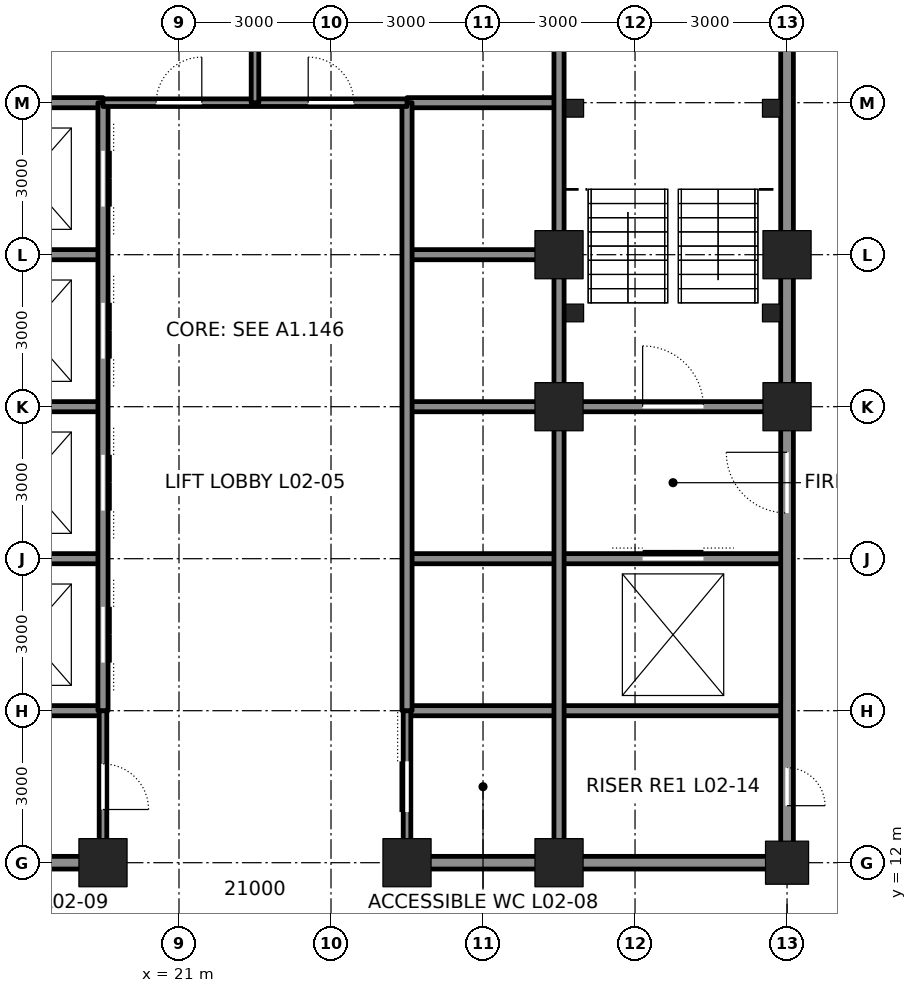
"""IFC4 building model, lengths in metres.
Left out: names, types, materials, properties, quantities, classifications, styles, units other than length and angle.
Written with IfcOpenShell. Run it as: python <this file> out.ifc"""

import sys

from ifc_helpers import new_model, si_unit, direction, frame, frame_2d, origin, origin_2d, place, context, subcontext, project, spatial, rectangle, hollow_rectangle, extrude, element, fill, save


model = new_model("IFC4")
c1 = context("Model", 3, precision=1e-05, world=origin(), true_north=direction((0.0, 1.0)))
c2 = subcontext(c1, "Body", "Model", "MODEL_VIEW")
j1 = project(units=[si_unit("LENGTHUNIT", "METRE"), si_unit("PLANEANGLEUNIT", "RADIAN")], contexts=[c1])
p1 = place(None, origin())
s1 = spatial("IfcSite", under=j1, at=p1, CompositionType="ELEMENT")
p2 = place(p1, origin())
s2 = spatial("IfcBuilding", under=s1, at=p2, CompositionType="ELEMENT")
p3 = place(p2, frame((0.0, 0.0, 13.5)))
s3 = spatial("IfcBuildingStorey", under=s2, at=p3, CompositionType="ELEMENT", Elevation=13.5)
for number, where, z_axis, x_axis in (
    (1, (19.5, 12.0, 0.0), (0.0, 0.0, 1.0), (1.0, 0.0, 0.0)),
    (2, (25.5, 12.0, 0.0), (0.0, 0.0, 1.0), (1.0, 0.0, 0.0)),
    (3, (28.5, 12.0, 0.0), (0.0, 0.0, 1.0), (1.0, 0.0, 0.0)),
):
    element("IfcColumn", number, at=place(p3, frame(where, z_axis=z_axis, x_axis=x_axis)), inside=s3, PredefinedType="COLUMN", context=c2, shape_type="SweptSolid", body=[
        extrude(hollow_rectangle(XDim=0.95, YDim=0.95, WallThickness=0.095, at=origin_2d()), origin(), (0.0, 0.0, 1.0), 6.0),
    ])
p4 = place(p3, frame((33.0, 12.0, 0.0), z_axis=(0.0, 0.0, 1.0), x_axis=(1.0, 0.0, 0.0)))
e4 = element("IfcColumn", 4, at=p4, inside=s3, PredefinedType="COLUMN", context=c2, shape_type="SweptSolid", body=[
    extrude(hollow_rectangle(XDim=0.85, YDim=0.85, WallThickness=0.085, at=origin_2d()), origin(), (0.0, 0.0, 1.0), 6.0),
])
for number, where, z_axis, x_axis in (
    (5, (33.0, 21.0, 0.0), (0.0, 0.0, 1.0), (1.0, 0.0, 0.0)),
    (6, (33.0, 24.0, 0.0), (0.0, 0.0, 1.0), (1.0, 0.0, 0.0)),
    (7, (28.5, 21.0, 0.0), (0.0, 0.0, 1.0), (1.0, 0.0, 0.0)),
    (8, (28.5, 24.0, 0.0), (0.0, 0.0, 1.0), (1.0, 0.0, 0.0)),
):
    element("IfcColumn", number, at=place(p3, frame(where, z_axis=z_axis, x_axis=x_axis)), inside=s3, PredefinedType="COLUMN", context=c2, shape_type="SweptSolid", body=[
        extrude(hollow_rectangle(XDim=0.95, YDim=0.95, WallThickness=0.095, at=origin_2d()), origin(), (0.0, 0.0, 1.0), 6.0),
    ])
for number, where, z_axis, x_axis in (
    (9, (16.75, 12.0, 0.0), (0.0, 0.0, 1.0), (1.0, 0.0, 0.0)),
    (10, (25.75, 12.0, 0.0), (0.0, 0.0, 1.0), (1.0, 0.0, 0.0)),
):
    element("IfcWall", number, at=place(p3, frame(where, z_axis=z_axis, x_axis=x_axis)), inside=s3, PredefinedType="SOLIDWALL", context=c2, shape_type="SweptSolid", body=[
        extrude(rectangle(XDim=2.5, YDim=0.25, at=frame_2d((1.25, 0.0))), origin(), (0.0, 0.0, 1.0), 4.941),
    ])
p5 = place(p3, frame((28.75, 12.0, 0.0), z_axis=(0.0, 0.0, 1.0), x_axis=(1.0, 0.0, 0.0)))
e11 = element("IfcWall", 11, at=p5, inside=s3, PredefinedType="SOLIDWALL", context=c2, shape_type="SweptSolid", body=[
    extrude(rectangle(XDim=4.0, YDim=0.25, at=frame_2d((2.0, 0.0))), origin(), (0.0, 0.0, 1.0), 4.941),
])
for number, where, z_axis, x_axis in (
    (12, (12.0, 15.0, 0.0), (0.0, 0.0, 1.0), (1.0, 0.0, 0.0)),
    (13, (25.5, 15.0, 0.0), (0.0, 0.0, 1.0), (1.0, 0.0, 0.0)),
):
    element("IfcWall", number, at=place(p3, frame(where, z_axis=z_axis, x_axis=x_axis)), inside=s3, PredefinedType="SOLIDWALL", context=c2, shape_type="SweptSolid", body=[
        extrude(rectangle(XDim=7.5, YDim=0.2, at=frame_2d((3.75, 0.0))), origin(), (0.0, 0.0, 1.0), 5.8),
    ])
for number, where, z_axis, x_axis in (
    (14, (16.75, 24.0, 0.0), (0.0, 0.0, 1.0), (1.0, 0.0, 0.0)),
    (15, (25.5, 24.0, 0.0), (0.0, 0.0, 1.0), (1.0, 0.0, 0.0)),
):
    element("IfcWall", number, at=place(p3, frame(where, z_axis=z_axis, x_axis=x_axis)), inside=s3, PredefinedType="SOLIDWALL", context=c2, shape_type="SweptSolid", body=[
        extrude(rectangle(XDim=2.75, YDim=0.2, at=frame_2d((1.375, 0.0))), origin(), (0.0, 0.0, 1.0), 4.85),
    ])
p6 = place(p3, frame((12.0, 27.0, 0.0), z_axis=(0.0, 0.0, 1.0), x_axis=(1.0, 0.0, 0.0)))
e16 = element("IfcWall", 16, at=p6, inside=s3, PredefinedType="SOLIDWALL", context=c2, shape_type="SweptSolid", body=[
    extrude(rectangle(XDim=7.5, YDim=0.2, at=frame_2d((3.75, 0.0))), origin(), (0.0, 0.0, 1.0), 5.8),
])
p7 = place(p6, frame((1.65, 0.0, 0.0)))
e17 = element("IfcOpeningElement", 17, at=p7, cuts=e16, PredefinedType="OPENING", context=c2, shape_type="SweptSolid", body=[
    extrude(rectangle(XDim=1.2, YDim=2.1, at=frame_2d((0.6, 1.05))), frame((0.0, 0.11, 0.0), z_axis=(0.0, -1.0, 0.0), x_axis=(1.0, 0.0, 0.0)), (0.0, 0.0, 1.0), 0.22),
])
for number, where, z_axis, x_axis in (
    (18, (25.5, 27.0, 0.0), (0.0, 0.0, 1.0), (1.0, 0.0, 0.0)),
    (19, (16.5, 18.0, 0.0), (0.0, 0.0, 1.0), (1.0, 0.0, 0.0)),
):
    element("IfcWall", number, at=place(p3, frame(where, z_axis=z_axis, x_axis=x_axis)), inside=s3, PredefinedType="SOLIDWALL", context=c2, shape_type="SweptSolid", body=[
        extrude(rectangle(XDim=3.0, YDim=0.2, at=frame_2d((1.5, 0.0))), origin(), (0.0, 0.0, 1.0), 5.8),
    ])
p8 = place(p3, frame((25.5, 18.0, 0.0), z_axis=(0.0, 0.0, 1.0), x_axis=(1.0, 0.0, 0.0)))
e20 = element("IfcWall", 20, at=p8, inside=s3, PredefinedType="SOLIDWALL", context=c2, shape_type="SweptSolid", body=[
    extrude(rectangle(XDim=7.5, YDim=0.2, at=frame_2d((3.75, 0.0))), origin(), (0.0, 0.0, 1.0), 5.8),
])
p9 = place(p8, frame((4.65, 0.0, 0.0)))
e21 = element("IfcOpeningElement", 21, at=p9, cuts=e20, PredefinedType="OPENING", context=c2, shape_type="SweptSolid", body=[
    extrude(rectangle(XDim=1.2, YDim=2.1, at=frame_2d((0.6, 1.05))), frame((0.0, 0.11, 0.0), z_axis=(0.0, -1.0, 0.0), x_axis=(1.0, 0.0, 0.0)), (0.0, 0.0, 1.0), 0.22),
])
for number, where, z_axis, x_axis in (
    (22, (16.75, 21.0, 0.0), (0.0, 0.0, 1.0), (1.0, 0.0, 0.0)),
    (23, (25.5, 21.0, 0.0), (0.0, 0.0, 1.0), (1.0, 0.0, 0.0)),
):
    element("IfcWall", number, at=place(p3, frame(where, z_axis=z_axis, x_axis=x_axis)), inside=s3, PredefinedType="SOLIDWALL", context=c2, shape_type="SweptSolid", body=[
        extrude(rectangle(XDim=2.75, YDim=0.2, at=frame_2d((1.375, 0.0))), origin(), (0.0, 0.0, 1.0), 4.85),
    ])
p10 = place(p3, frame((28.75, 21.0, 0.0), z_axis=(0.0, 0.0, 1.0), x_axis=(1.0, 0.0, 0.0)))
e24 = element("IfcWall", 24, at=p10, inside=s3, PredefinedType="SOLIDWALL", context=c2, shape_type="SweptSolid", body=[
    extrude(rectangle(XDim=4.0, YDim=0.2, at=frame_2d((2.0, 0.0))), origin(), (0.0, 0.0, 1.0), 4.85),
])
p11 = place(p10, frame((1.4, 0.0, 0.0)))
e25 = element("IfcOpeningElement", 25, at=p11, cuts=e24, PredefinedType="OPENING", context=c2, shape_type="SweptSolid", body=[
    extrude(rectangle(XDim=1.2, YDim=2.1, at=frame_2d((0.6, 1.05))), frame((0.0, 0.11, 0.0), z_axis=(0.0, -1.0, 0.0), x_axis=(1.0, 0.0, 0.0)), (0.0, 0.0, 1.0), 0.22),
])
p12 = place(p3, frame((19.5, 12.25, 0.0), z_axis=(0.0, 0.0, 1.0), x_axis=(0.0, 1.0, 0.0)))
e26 = element("IfcWall", 26, at=p12, inside=s3, PredefinedType="PARTITIONING", context=c2, shape_type="SweptSolid", body=[
    extrude(rectangle(XDim=2.75, YDim=0.15, at=frame_2d((1.375, 0.0))), origin(), (0.0, 0.0, 1.0), 4.825),
])
p13 = place(p12, frame((0.8, 0.0, 0.0)))
e27 = element("IfcOpeningElement", 27, at=p13, cuts=e26, PredefinedType="OPENING", context=c2, shape_type="SweptSolid", body=[
    extrude(rectangle(XDim=0.9, YDim=2.1, at=frame_2d((0.45, 1.05))), frame((0.0, 0.085, 0.0), z_axis=(0.0, -1.0, 0.0), x_axis=(1.0, 0.0, 0.0)), (0.0, 0.0, 1.0), 0.17),
])
p14 = place(p3, frame((19.5, 15.0, 0.0), z_axis=(0.0, 0.0, 1.0), x_axis=(0.0, 1.0, 0.0)))
e28 = element("IfcWall", 28, at=p14, inside=s3, PredefinedType="SOLIDWALL", context=c2, shape_type="SweptSolid", body=[
    extrude(rectangle(XDim=12.0, YDim=0.2, at=frame_2d((6.0, 0.0))), origin(), (0.0, 0.0, 1.0), 4.825),
])
p15 = place(p14, frame((0.95, 0.0, 0.0)))
e29 = element("IfcOpeningElement", 29, at=p15, cuts=e28, PredefinedType="OPENING", context=c2, shape_type="SweptSolid", body=[
    extrude(rectangle(XDim=1.1, YDim=2.1, at=frame_2d((0.55, 1.05))), frame((0.0, 0.11, 0.0), z_axis=(0.0, -1.0, 0.0), x_axis=(1.0, 0.0, 0.0)), (0.0, 0.0, 1.0), 0.22),
])
p16 = place(p14, frame((3.95, 0.0, 0.0)))
e30 = element("IfcOpeningElement", 30, at=p16, cuts=e28, PredefinedType="OPENING", context=c2, shape_type="SweptSolid", body=[
    extrude(rectangle(XDim=1.1, YDim=2.1, at=frame_2d((0.55, 1.05))), frame((0.0, 0.11, 0.0), z_axis=(0.0, -1.0, 0.0), x_axis=(1.0, 0.0, 0.0)), (0.0, 0.0, 1.0), 0.22),
])
p17 = place(p14, frame((6.95, 0.0, 0.0)))
e31 = element("IfcOpeningElement", 31, at=p17, cuts=e28, PredefinedType="OPENING", context=c2, shape_type="SweptSolid", body=[
    extrude(rectangle(XDim=1.1, YDim=2.1, at=frame_2d((0.55, 1.05))), frame((0.0, 0.11, 0.0), z_axis=(0.0, -1.0, 0.0), x_axis=(1.0, 0.0, 0.0)), (0.0, 0.0, 1.0), 0.22),
])
p18 = place(p14, frame((9.95, 0.0, 0.0)))
e32 = element("IfcOpeningElement", 32, at=p18, cuts=e28, PredefinedType="OPENING", context=c2, shape_type="SweptSolid", body=[
    extrude(rectangle(XDim=1.1, YDim=2.1, at=frame_2d((0.55, 1.05))), frame((0.0, 0.11, 0.0), z_axis=(0.0, -1.0, 0.0), x_axis=(1.0, 0.0, 0.0)), (0.0, 0.0, 1.0), 0.22),
])
p19 = place(p3, frame((25.5, 12.25, 0.0), z_axis=(0.0, 0.0, 1.0), x_axis=(0.0, 1.0, 0.0)))
e33 = element("IfcWall", 33, at=p19, inside=s3, PredefinedType="PARTITIONING", context=c2, shape_type="SweptSolid", body=[
    extrude(rectangle(XDim=2.75, YDim=0.15, at=frame_2d((1.375, 0.0))), origin(), (0.0, 0.0, 1.0), 4.825),
])
p20 = place(p19, frame((0.75, 0.0, 0.0)))
e34 = element("IfcOpeningElement", 34, at=p20, cuts=e33, PredefinedType="OPENING", context=c2, shape_type="SweptSolid", body=[
    extrude(rectangle(XDim=1.0, YDim=2.1, at=frame_2d((0.5, 1.05))), frame((0.0, 0.085, 0.0), z_axis=(0.0, -1.0, 0.0), x_axis=(1.0, 0.0, 0.0)), (0.0, 0.0, 1.0), 0.17),
])
p21 = place(p3, frame((25.5, 15.0, 0.0), z_axis=(0.0, 0.0, 1.0), x_axis=(0.0, 1.0, 0.0)))
e35 = element("IfcWall", 35, at=p21, inside=s3, PredefinedType="SOLIDWALL", context=c2, shape_type="SweptSolid", body=[
    extrude(rectangle(XDim=12.0, YDim=0.2, at=frame_2d((6.0, 0.0))), origin(), (0.0, 0.0, 1.0), 4.825),
])
p22 = place(p3, frame((28.5, 12.25, 0.0), z_axis=(0.0, 0.0, 1.0), x_axis=(0.0, 1.0, 0.0)))
e36 = element("IfcWall", 36, at=p22, inside=s3, PredefinedType="SOLIDWALL", context=c2, shape_type="SweptSolid", body=[
    extrude(rectangle(XDim=8.5, YDim=0.2, at=frame_2d((4.25, 0.0))), origin(), (0.0, 0.0, 1.0), 4.873),
])
p23 = place(p3, frame((28.5, 21.25, 0.0), z_axis=(0.0, 0.0, 1.0), x_axis=(0.0, 1.0, 0.0)))
e37 = element("IfcWall", 37, at=p23, inside=s3, PredefinedType="SOLIDWALL", context=c2, shape_type="SweptSolid", body=[
    extrude(rectangle(XDim=2.5, YDim=0.2, at=frame_2d((1.25, 0.0))), origin(), (0.0, 0.0, 1.0), 4.873),
])
p24 = place(p3, frame((28.5, 24.25, 0.0), z_axis=(0.0, 0.0, 1.0), x_axis=(0.0, 1.0, 0.0)))
e38 = element("IfcWall", 38, at=p24, inside=s3, PredefinedType="SOLIDWALL", context=c2, shape_type="SweptSolid", body=[
    extrude(rectangle(XDim=8.5, YDim=0.2, at=frame_2d((4.25, 0.0))), origin(), (0.0, 0.0, 1.0), 4.873),
])
p25 = place(p3, frame((33.0, 12.25, 0.0), z_axis=(0.0, 0.0, 1.0), x_axis=(0.0, 1.0, 0.0)))
e39 = element("IfcWall", 39, at=p25, inside=s3, PredefinedType="SOLIDWALL", context=c2, shape_type="SweptSolid", body=[
    extrude(rectangle(XDim=8.5, YDim=0.25, at=frame_2d((4.25, 0.0))), origin(), (0.0, 0.0, 1.0), 4.873),
])
p26 = place(p25, frame((6.65, 0.0, 0.0)))
e40 = element("IfcOpeningElement", 40, at=p26, cuts=e39, PredefinedType="OPENING", context=c2, shape_type="SweptSolid", body=[
    extrude(rectangle(XDim=1.2, YDim=2.1, at=frame_2d((0.6, 1.05))), frame((0.0, 0.135, 0.0), z_axis=(0.0, -1.0, 0.0), x_axis=(1.0, 0.0, 0.0)), (0.0, 0.0, 1.0), 0.27),
])
p27 = place(p25, frame((0.875, 0.0, 0.0)))
e41 = element("IfcOpeningElement", 41, at=p27, cuts=e39, PredefinedType="OPENING", context=c2, shape_type="SweptSolid", body=[
    extrude(rectangle(XDim=0.75, YDim=2.1, at=frame_2d((0.375, 1.05))), frame((0.0, 0.135, 0.0), z_axis=(0.0, -1.0, 0.0), x_axis=(1.0, 0.0, 0.0)), (0.0, 0.0, 1.0), 0.27),
])
p28 = place(p3, frame((33.0, 21.25, 0.0), z_axis=(0.0, 0.0, 1.0), x_axis=(0.0, 1.0, 0.0)))
e42 = element("IfcWall", 42, at=p28, inside=s3, PredefinedType="SOLIDWALL", context=c2, shape_type="SweptSolid", body=[
    extrude(rectangle(XDim=2.5, YDim=0.25, at=frame_2d((1.25, 0.0))), origin(), (0.0, 0.0, 1.0), 4.873),
])
p29 = place(p3, frame((33.0, 24.25, 0.0), z_axis=(0.0, 0.0, 1.0), x_axis=(0.0, 1.0, 0.0)))
e43 = element("IfcWall", 43, at=p29, inside=s3, PredefinedType="SOLIDWALL", context=c2, shape_type="SweptSolid", body=[
    extrude(rectangle(XDim=8.5, YDim=0.25, at=frame_2d((4.25, 0.0))), origin(), (0.0, 0.0, 1.0), 4.873),
])
p30 = place(p29, frame((6.875, 0.0, 0.0)))
e44 = element("IfcOpeningElement", 44, at=p30, cuts=e43, PredefinedType="OPENING", context=c2, shape_type="SweptSolid", body=[
    extrude(rectangle(XDim=0.75, YDim=2.1, at=frame_2d((0.375, 1.05))), frame((0.0, 0.135, 0.0), z_axis=(0.0, -1.0, 0.0), x_axis=(1.0, 0.0, 0.0)), (0.0, 0.0, 1.0), 0.27),
])
p31 = place(p3, frame((19.5, 27.0, 0.0), z_axis=(0.0, 0.0, 1.0), x_axis=(1.0, 0.0, 0.0)))
e45 = element("IfcWall", 45, at=p31, inside=s3, PredefinedType="PARTITIONING", context=c2, shape_type="SweptSolid", body=[
    extrude(rectangle(XDim=6.0, YDim=0.15, at=frame_2d((3.0, 0.0))), origin(), (0.0, 0.0, 1.0), 5.8),
])
p32 = place(p31, frame((1.05, 0.0, 0.0)))
e46 = element("IfcOpeningElement", 46, at=p32, cuts=e45, PredefinedType="OPENING", context=c2, shape_type="SweptSolid", body=[
    extrude(rectangle(XDim=0.9, YDim=2.1, at=frame_2d((0.45, 1.05))), frame((0.0, 0.085, 0.0), z_axis=(0.0, -1.0, 0.0), x_axis=(1.0, 0.0, 0.0)), (0.0, 0.0, 1.0), 0.17),
])
p33 = place(p31, frame((4.05, 0.0, 0.0)))
e47 = element("IfcOpeningElement", 47, at=p33, cuts=e45, PredefinedType="OPENING", context=c2, shape_type="SweptSolid", body=[
    extrude(rectangle(XDim=0.9, YDim=2.1, at=frame_2d((0.45, 1.05))), frame((0.0, 0.085, 0.0), z_axis=(0.0, -1.0, 0.0), x_axis=(1.0, 0.0, 0.0)), (0.0, 0.0, 1.0), 0.17),
])
p34 = place(p3, frame((22.5, 27.0, 0.0), z_axis=(0.0, 0.0, 1.0), x_axis=(0.0, 1.0, 0.0)))
e48 = element("IfcWall", 48, at=p34, inside=s3, PredefinedType="PARTITIONING", context=c2, shape_type="SweptSolid", body=[
    extrude(rectangle(XDim=6.0, YDim=0.15, at=frame_2d((3.0, 0.0))), origin(), (0.0, 0.0, 1.0), 5.8),
])
for number, where, z_axis, x_axis in (
    (49, (28.81, 26.89, 0.0), (0.0, 0.0, 1.0), (1.0, 0.0, 0.0)),
    (50, (32.69, 26.89, 0.0), (0.0, 0.0, 1.0), (1.0, 0.0, 0.0)),
    (51, (28.81, 22.85, 0.0), (0.0, 0.0, 1.0), (1.0, 0.0, 0.0)),
    (52, (32.69, 22.85, 0.0), (0.0, 0.0, 1.0), (1.0, 0.0, 0.0)),
):
    element("IfcColumn", number, at=place(p3, frame(where, z_axis=z_axis, x_axis=x_axis)), inside=s3, PredefinedType="COLUMN", context=c2, shape_type="SweptSolid", body=[
        extrude(hollow_rectangle(XDim=0.35, YDim=0.35, WallThickness=0.035, at=origin_2d()), origin(), (0.0, 0.0, 1.0), 6.0),
    ])
p35 = place(p11, origin())
e53 = element("IfcDoor", 53, at=p35, inside=s3, OperationType="SINGLE_SWING_LEFT", PredefinedType="DOOR", context=c2, shape_type="SweptSolid", body=[
    extrude(rectangle(XDim=1.2, YDim=2.1, at=frame_2d((0.6, 1.05))), frame((0.0, 0.025, 0.0), z_axis=(0.0, -1.0, 0.0), x_axis=(1.0, 0.0, 0.0)), (0.0, 0.0, 1.0), 0.05),
])
fill(e25, e53)
p36 = place(p26, origin())
e54 = element("IfcDoor", 54, at=p36, inside=s3, OperationType="SINGLE_SWING_RIGHT", PredefinedType="DOOR", context=c2, shape_type="SweptSolid", body=[
    extrude(rectangle(XDim=1.2, YDim=2.1, at=frame_2d((0.6, 1.05))), frame((0.0, 0.025, 0.0), z_axis=(0.0, -1.0, 0.0), x_axis=(1.0, 0.0, 0.0)), (0.0, 0.0, 1.0), 0.05),
])
fill(e40, e54)
p37 = place(p9, origin())
e55 = element("IfcDoor", 55, at=p37, inside=s3, OperationType="DOUBLE_DOOR_SLIDING", PredefinedType="DOOR", context=c2, shape_type="SweptSolid", body=[
    extrude(rectangle(XDim=1.2, YDim=2.1, at=frame_2d((0.6, 1.05))), frame((0.0, 0.025, 0.0), z_axis=(0.0, -1.0, 0.0), x_axis=(1.0, 0.0, 0.0)), (0.0, 0.0, 1.0), 0.05),
])
fill(e21, e55)
p38 = place(p27, frame((0.75, 0.0, 0.0), z_axis=(0.0, 0.0, 1.0), x_axis=(-1.0, 0.0, 0.0)))
e56 = element("IfcDoor", 56, at=p38, inside=s3, OperationType="SINGLE_SWING_RIGHT", PredefinedType="DOOR", context=c2, shape_type="SweptSolid", body=[
    extrude(rectangle(XDim=0.75, YDim=2.1, at=frame_2d((0.375, 1.05))), frame((0.0, 0.025, 0.0), z_axis=(0.0, -1.0, 0.0), x_axis=(1.0, 0.0, 0.0)), (0.0, 0.0, 1.0), 0.05),
])
fill(e41, e56)
p39 = place(p32, origin())
e57 = element("IfcDoor", 57, at=p39, inside=s3, OperationType="SINGLE_SWING_RIGHT", PredefinedType="DOOR", context=c2, shape_type="SweptSolid", body=[
    extrude(rectangle(XDim=0.9, YDim=2.1, at=frame_2d((0.45, 1.05))), frame((0.0, 0.025, 0.0), z_axis=(0.0, -1.0, 0.0), x_axis=(1.0, 0.0, 0.0)), (0.0, 0.0, 1.0), 0.05),
])
fill(e46, e57)
p40 = place(p33, origin())
e58 = element("IfcDoor", 58, at=p40, inside=s3, OperationType="SINGLE_SWING_LEFT", PredefinedType="DOOR", context=c2, shape_type="SweptSolid", body=[
    extrude(rectangle(XDim=0.9, YDim=2.1, at=frame_2d((0.45, 1.05))), frame((0.0, 0.025, 0.0), z_axis=(0.0, -1.0, 0.0), x_axis=(1.0, 0.0, 0.0)), (0.0, 0.0, 1.0), 0.05),
])
fill(e47, e58)
p41 = place(p20, origin())
e59 = element("IfcDoor", 59, at=p41, inside=s3, OperationType="SLIDING_TO_LEFT", PredefinedType="DOOR", context=c2, shape_type="SweptSolid", body=[
    extrude(rectangle(XDim=1.0, YDim=2.1, at=frame_2d((0.5, 1.05))), frame((0.0, 0.025, 0.0), z_axis=(0.0, -1.0, 0.0), x_axis=(1.0, 0.0, 0.0)), (0.0, 0.0, 1.0), 0.05),
])
fill(e34, e59)
p42 = place(p13, frame((0.9, 0.0, 0.0), z_axis=(0.0, 0.0, 1.0), x_axis=(-1.0, 0.0, 0.0)))
e60 = element("IfcDoor", 60, at=p42, inside=s3, OperationType="SINGLE_SWING_RIGHT", PredefinedType="DOOR", context=c2, shape_type="SweptSolid", body=[
    extrude(rectangle(XDim=0.9, YDim=2.1, at=frame_2d((0.45, 1.05))), frame((0.0, 0.025, 0.0), z_axis=(0.0, -1.0, 0.0), x_axis=(1.0, 0.0, 0.0)), (0.0, 0.0, 1.0), 0.05),
])
fill(e27, e60)
p43 = place(p15, origin())
e61 = element("IfcDoor", 61, at=p43, inside=s3, OperationType="DOUBLE_DOOR_SLIDING", PredefinedType="DOOR", context=c2, shape_type="SweptSolid", body=[
    extrude(rectangle(XDim=1.1, YDim=2.1, at=frame_2d((0.55, 1.05))), frame((0.0, 0.025, 0.0), z_axis=(0.0, -1.0, 0.0), x_axis=(1.0, 0.0, 0.0)), (0.0, 0.0, 1.0), 0.05),
])
fill(e29, e61)
p44 = place(p16, origin())
e62 = element("IfcDoor", 62, at=p44, inside=s3, OperationType="DOUBLE_DOOR_SLIDING", PredefinedType="DOOR", context=c2, shape_type="SweptSolid", body=[
    extrude(rectangle(XDim=1.1, YDim=2.1, at=frame_2d((0.55, 1.05))), frame((0.0, 0.025, 0.0), z_axis=(0.0, -1.0, 0.0), x_axis=(1.0, 0.0, 0.0)), (0.0, 0.0, 1.0), 0.05),
])
fill(e30, e62)
p45 = place(p17, origin())
e63 = element("IfcDoor", 63, at=p45, inside=s3, OperationType="DOUBLE_DOOR_SLIDING", PredefinedType="DOOR", context=c2, shape_type="SweptSolid", body=[
    extrude(rectangle(XDim=1.1, YDim=2.1, at=frame_2d((0.55, 1.05))), frame((0.0, 0.025, 0.0), z_axis=(0.0, -1.0, 0.0), x_axis=(1.0, 0.0, 0.0)), (0.0, 0.0, 1.0), 0.05),
])
fill(e31, e63)
p46 = place(p18, origin())
e64 = element("IfcDoor", 64, at=p46, inside=s3, OperationType="DOUBLE_DOOR_SLIDING", PredefinedType="DOOR", context=c2, shape_type="SweptSolid", body=[
    extrude(rectangle(XDim=1.1, YDim=2.1, at=frame_2d((0.55, 1.05))), frame((0.0, 0.025, 0.0), z_axis=(0.0, -1.0, 0.0), x_axis=(1.0, 0.0, 0.0)), (0.0, 0.0, 1.0), 0.05),
])
fill(e32, e64)
save(model, sys.argv[1])
